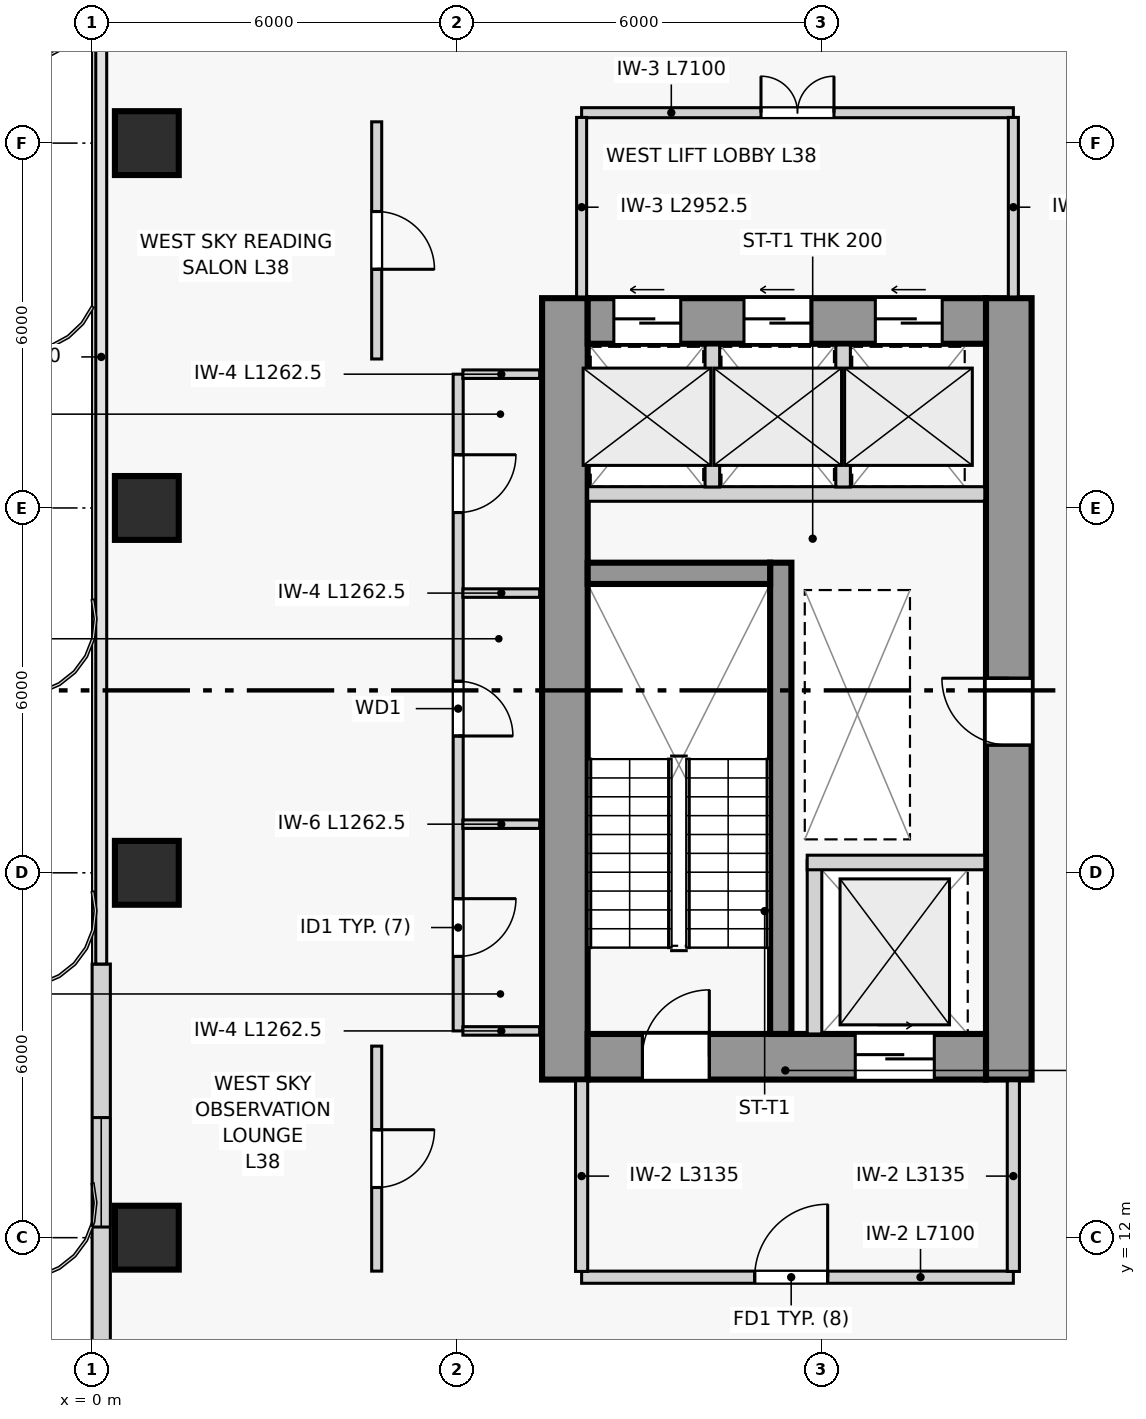
"""IFC4 building model, lengths in metres.
Left out: names, types, materials, properties, quantities, classifications, styles, units other than length and angle.
Written with IfcOpenShell. Run it as: python <this file> out.ifc"""

import sys

from ifc_helpers import new_model, si_unit, direction, frame, frame_2d, origin, origin_2d, place, context, subcontext, project, spatial, rectangle, extrude, source, transform, mapped, element, fill, save


model = new_model("IFC4")
c1 = context("Model", 3, precision=1e-05, world=origin(), true_north=direction((0.0, 1.0)))
c2 = subcontext(c1, "Body", "Model", "MODEL_VIEW")
j1 = project(units=[si_unit("LENGTHUNIT", "METRE"), si_unit("PLANEANGLEUNIT", "RADIAN")], contexts=[c1])
p1 = place(None, origin())
s1 = spatial("IfcSite", under=j1, at=p1, CompositionType="ELEMENT")
p2 = place(p1, origin())
s2 = spatial("IfcBuilding", under=s1, at=p2, CompositionType="ELEMENT")
p3 = place(p2, frame((0.0, 0.0, 144.9)))
s3 = spatial("IfcBuildingStorey", under=s2, at=p3, CompositionType="ELEMENT", Elevation=144.9)
p4 = place(p3, frame((7.775, 14.6, 0.0), z_axis=(0.0, 0.0, 1.0), x_axis=(0.0, 1.0, 0.0)))
e1 = element("IfcWall", 1, at=p4, inside=s3, PredefinedType="SHEAR", context=c2, shape_type="SweptSolid", body=[
    extrude(rectangle(XDim=12.85, YDim=0.75, at=frame_2d((6.425, 0.0))), origin(), (0.0, 0.0, 1.0), 3.6),
])
p5 = place(p3, frame((15.075, 14.6, 0.0), z_axis=(0.0, 0.0, 1.0), x_axis=(0.0, 1.0, 0.0)))
e2 = element("IfcWall", 2, at=p5, inside=s3, PredefinedType="SHEAR", context=c2, shape_type="SweptSolid", body=[
    extrude(rectangle(XDim=12.85, YDim=0.75, at=frame_2d((6.425, 0.0))), origin(), (0.0, 0.0, 1.0), 3.6),
])
p6 = place(p5, frame((5.5, 0.0, 0.0)))
e3 = element("IfcOpeningElement", 3, at=p6, cuts=e2, PredefinedType="OPENING", context=c2, shape_type="SweptSolid", body=[
    extrude(rectangle(XDim=1.1, YDim=2.2, at=frame_2d((0.55, 1.1))), frame((0.0, 0.385, 0.0), z_axis=(0.0, -1.0, 0.0), x_axis=(1.0, 0.0, 0.0)), (0.0, 0.0, 1.0), 0.77),
])
p7 = place(p3, frame((8.15, 14.975, 0.0), z_axis=(0.0, 0.0, 1.0), x_axis=(1.0, 0.0, 0.0)))
e4 = element("IfcWall", 4, at=p7, inside=s3, PredefinedType="SHEAR", context=c2, shape_type="SweptSolid", body=[
    extrude(rectangle(XDim=6.55, YDim=0.75, at=frame_2d((3.275, 0.0))), origin(), (0.0, 0.0, 1.0), 3.6),
])
p8 = place(p7, frame((0.9, 0.0, 0.0)))
e5 = element("IfcOpeningElement", 5, at=p8, cuts=e4, PredefinedType="OPENING", context=c2, shape_type="SweptSolid", body=[
    extrude(rectangle(XDim=1.1, YDim=2.2, at=frame_2d((0.55, 1.1))), frame((0.0, 0.385, 0.0), z_axis=(0.0, -1.0, 0.0), x_axis=(1.0, 0.0, 0.0)), (0.0, 0.0, 1.0), 0.77),
])
p9 = place(p7, frame((4.4, 0.0, 0.0)))
e6 = element("IfcOpeningElement", 6, at=p9, cuts=e4, PredefinedType="OPENING", context=c2, shape_type="SweptSolid", body=[
    extrude(rectangle(XDim=1.3, YDim=2.2, at=frame_2d((0.65, 1.1))), frame((0.0, 0.385, 0.0), z_axis=(0.0, -1.0, 0.0), x_axis=(1.0, 0.0, 0.0)), (0.0, 0.0, 1.0), 0.77),
])
p10 = place(p3, frame((8.15, 27.075, 0.0), z_axis=(0.0, 0.0, 1.0), x_axis=(1.0, 0.0, 0.0)))
e7 = element("IfcWall", 7, at=p10, inside=s3, PredefinedType="SHEAR", context=c2, shape_type="SweptSolid", body=[
    extrude(rectangle(XDim=6.55, YDim=0.75, at=frame_2d((3.275, 0.0))), origin(), (0.0, 0.0, 1.0), 3.6),
])
p11 = place(p10, frame((0.43, 0.0, 0.0)))
e8 = element("IfcOpeningElement", 8, at=p11, cuts=e7, PredefinedType="OPENING", context=c2, shape_type="SweptSolid", body=[
    extrude(rectangle(XDim=1.1, YDim=2.2, at=frame_2d((0.55, 1.1))), frame((0.0, 0.385, 0.0), z_axis=(0.0, -1.0, 0.0), x_axis=(1.0, 0.0, 0.0)), (0.0, 0.0, 1.0), 0.77),
])
p12 = place(p10, frame((2.57, 0.0, 0.0)))
e9 = element("IfcOpeningElement", 9, at=p12, cuts=e7, PredefinedType="OPENING", context=c2, shape_type="SweptSolid", body=[
    extrude(rectangle(XDim=1.1, YDim=2.2, at=frame_2d((0.55, 1.1))), frame((0.0, 0.385, 0.0), z_axis=(0.0, -1.0, 0.0), x_axis=(1.0, 0.0, 0.0)), (0.0, 0.0, 1.0), 0.77),
])
p13 = place(p10, frame((4.73, 0.0, 0.0)))
e10 = element("IfcOpeningElement", 10, at=p13, cuts=e7, PredefinedType="OPENING", context=c2, shape_type="SweptSolid", body=[
    extrude(rectangle(XDim=1.1, YDim=2.2, at=frame_2d((0.55, 1.1))), frame((0.0, 0.385, 0.0), z_axis=(0.0, -1.0, 0.0), x_axis=(1.0, 0.0, 0.0)), (0.0, 0.0, 1.0), 0.77),
])
p14 = place(p3, frame((11.325, 15.35, 0.0), z_axis=(0.0, 0.0, 1.0), x_axis=(0.0, 1.0, 0.0)))
e11 = element("IfcWall", 11, at=p14, inside=s3, PredefinedType="SHEAR", context=c2, shape_type="SweptSolid", body=[
    extrude(rectangle(XDim=7.75, YDim=0.35, at=frame_2d((3.875, 0.0))), origin(), (0.0, 0.0, 1.0), 3.6),
])
p15 = place(p3, frame((8.15, 22.925, 0.0), z_axis=(0.0, 0.0, 1.0), x_axis=(1.0, 0.0, 0.0)))
e12 = element("IfcWall", 12, at=p15, inside=s3, PredefinedType="SHEAR", context=c2, shape_type="SweptSolid", body=[
    extrude(rectangle(XDim=3.0, YDim=0.35, at=frame_2d((1.5, 0.0))), origin(), (0.0, 0.0, 1.0), 3.6),
])
m1 = source(origin(), c2, "Body", "SweptSolid", [
    extrude(rectangle(XDim=1.05, YDim=1.05, at=origin_2d()), origin(), (0.0, 0.0, 1.0), 3.6),
])
for number, where, z_axis, x_axis in (
    (13, (0.9, 12.0, 0.0), (0.0, 0.0, 1.0), (1.0, 0.0, 0.0)),
    (14, (0.9, 18.0, 0.0), (0.0, 0.0, 1.0), (1.0, 0.0, 0.0)),
    (15, (0.9, 24.0, 0.0), (0.0, 0.0, 1.0), (1.0, 0.0, 0.0)),
    (16, (0.9, 30.0, 0.0), (0.0, 0.0, 1.0), (1.0, 0.0, 0.0)),
):
    element("IfcColumn", number, at=place(p3, frame(where, z_axis=z_axis, x_axis=x_axis)), inside=s3, PredefinedType="COLUMN", context=c2, shape_type="MappedRepresentation", body=[
        mapped(m1, transform((0.0, 0.0, 0.0), scale=1.0)),
    ])
p16 = place(p3, frame((0.15, 16.5, 0.0), z_axis=(0.0, 0.0, 1.0), x_axis=(0.0, -1.0, 0.0)))
e17 = element("IfcWall", 17, at=p16, inside=s3, PredefinedType="SOLIDWALL", context=c2, shape_type="SweptSolid", body=[
    extrude(rectangle(XDim=12.75, YDim=0.3, at=frame_2d((6.375, 0.0))), origin(), (0.0, 0.0, 1.0), 3.28),
])
p17 = place(p16, frame((2.525, 0.0, 0.8)))
e18 = element("IfcOpeningElement", 18, at=p17, cuts=e17, PredefinedType="OPENING", context=c2, shape_type="SweptSolid", body=[
    extrude(rectangle(XDim=1.8, YDim=2.1, at=frame_2d((0.9, 1.05))), frame((0.0, 0.16, 0.0), z_axis=(0.0, -1.0, 0.0), x_axis=(1.0, 0.0, 0.0)), (0.0, 0.0, 1.0), 0.32),
])
p18 = place(p16, frame((8.8, 0.0, 0.8)))
e19 = element("IfcOpeningElement", 19, at=p18, cuts=e17, PredefinedType="OPENING", context=c2, shape_type="SweptSolid", body=[
    extrude(rectangle(XDim=1.8, YDim=2.1, at=frame_2d((0.9, 1.05))), frame((0.0, 0.16, 0.0), z_axis=(0.0, -1.0, 0.0), x_axis=(1.0, 0.0, 0.0)), (0.0, 0.0, 1.0), 0.32),
])
p19 = place(p3, frame((11.88, 15.35, 0.0), z_axis=(0.0, 0.0, 1.0), x_axis=(0.0, 1.0, 0.0)))
e20 = element("IfcWall", 20, at=p19, inside=s3, PredefinedType="PARTITIONING", context=c2, shape_type="SweptSolid", body=[
    extrude(rectangle(XDim=2.85, YDim=0.24, at=frame_2d((1.425, 0.0))), origin(), (0.0, 0.0, 1.0), 3.28),
])
p20 = place(p3, frame((11.76, 18.17, 0.0), z_axis=(0.0, 0.0, 1.0), x_axis=(1.0, 0.0, 0.0)))
e21 = element("IfcWall", 21, at=p20, inside=s3, PredefinedType="PARTITIONING", context=c2, shape_type="SweptSolid", body=[
    extrude(rectangle(XDim=2.92, YDim=0.24, at=frame_2d((1.46, 0.0))), origin(), (0.0, 0.0, 1.0), 3.28),
])
p21 = place(p3, frame((8.05, 11.35, 0.0), z_axis=(0.0, 0.0, 1.0), x_axis=(1.0, 0.0, 0.0)))
e22 = element("IfcWall", 22, at=p21, inside=s3, PredefinedType="PARTITIONING", context=c2, shape_type="SweptSolid", body=[
    extrude(rectangle(XDim=7.1, YDim=0.2, at=frame_2d((3.55, 0.0))), origin(), (0.0, 0.0, 1.0), 3.28),
])
p22 = place(p21, frame((2.846, 0.0, 0.0)))
e23 = element("IfcOpeningElement", 23, at=p22, cuts=e22, PredefinedType="OPENING", context=c2, shape_type="SweptSolid", body=[
    extrude(rectangle(XDim=1.2, YDim=2.2, at=frame_2d((0.6, 1.1))), frame((0.0, 0.11, 0.0), z_axis=(0.0, -1.0, 0.0), x_axis=(1.0, 0.0, 0.0)), (0.0, 0.0, 1.0), 0.22),
])
for number, where, z_axis, x_axis in (
    (24, (8.05, 11.445, 0.0), (0.0, 0.0, 1.0), (0.0, 1.0, 0.0)),
    (25, (15.15, 11.445, 0.0), (0.0, 0.0, 1.0), (0.0, 1.0, 0.0)),
):
    element("IfcWall", number, at=place(p3, frame(where, z_axis=z_axis, x_axis=x_axis)), inside=s3, PredefinedType="PARTITIONING", context=c2, shape_type="SweptSolid", body=[
        extrude(rectangle(XDim=3.135, YDim=0.2, at=frame_2d((1.567, 0.0))), origin(), (0.0, 0.0, 1.0), 3.28),
    ])
p23 = place(p3, frame((8.15, 24.23, 0.0), z_axis=(0.0, 0.0, 1.0), x_axis=(1.0, 0.0, 0.0)))
e26 = element("IfcWall", 26, at=p23, inside=s3, PredefinedType="PARTITIONING", context=c2, shape_type="SweptSolid", body=[
    extrude(rectangle(XDim=6.53, YDim=0.24, at=frame_2d((3.265, 0.0))), origin(), (0.0, 0.0, 1.0), 3.28),
])
for number, where, z_axis, x_axis in (
    (27, (10.2, 24.345, 0.0), (0.0, 0.0, 1.0), (0.0, 1.0, 0.0)),
    (28, (12.35, 24.345, 0.0), (0.0, 0.0, 1.0), (0.0, 1.0, 0.0)),
):
    element("IfcWall", number, at=place(p3, frame(where, z_axis=z_axis, x_axis=x_axis)), inside=s3, PredefinedType="PARTITIONING", context=c2, shape_type="SweptSolid", body=[
        extrude(rectangle(XDim=2.335, YDim=0.24, at=frame_2d((1.167, 0.0))), origin(), (0.0, 0.0, 1.0), 3.28),
    ])
p24 = place(p3, frame((8.05, 30.5, 0.0), z_axis=(0.0, 0.0, 1.0), x_axis=(1.0, 0.0, 0.0)))
e29 = element("IfcWall", 29, at=p24, inside=s3, PredefinedType="PARTITIONING", context=c2, shape_type="SweptSolid", body=[
    extrude(rectangle(XDim=7.1, YDim=0.165, at=frame_2d((3.55, 0.0))), origin(), (0.0, 0.0, 1.0), 3.28),
])
p25 = place(p24, frame((2.95, 0.0, 0.0)))
e30 = element("IfcOpeningElement", 30, at=p25, cuts=e29, PredefinedType="OPENING", context=c2, shape_type="SweptSolid", body=[
    extrude(rectangle(XDim=1.2, YDim=2.2, at=frame_2d((0.6, 1.1))), frame((0.0, 0.093, 0.0), z_axis=(0.0, -1.0, 0.0), x_axis=(1.0, 0.0, 0.0)), (0.0, 0.0, 1.0), 0.185),
])
for number, where, z_axis, x_axis in (
    (31, (8.05, 27.47, 0.0), (0.0, 0.0, 1.0), (0.0, 1.0, 0.0)),
    (32, (15.15, 27.47, 0.0), (0.0, 0.0, 1.0), (0.0, 1.0, 0.0)),
):
    element("IfcWall", number, at=place(p3, frame(where, z_axis=z_axis, x_axis=x_axis)), inside=s3, PredefinedType="PARTITIONING", context=c2, shape_type="SweptSolid", body=[
        extrude(rectangle(XDim=2.953, YDim=0.165, at=frame_2d((1.476, 0.0))), origin(), (0.0, 0.0, 1.0), 3.28),
    ])
p26 = place(p3, frame((6.02, 15.4, 0.0), z_axis=(0.0, 0.0, 1.0), x_axis=(0.0, 1.0, 0.0)))
e33 = element("IfcWall", 33, at=p26, inside=s3, PredefinedType="PARTITIONING", context=c2, shape_type="SweptSolid", body=[
    extrude(rectangle(XDim=10.8, YDim=0.165, at=frame_2d((5.4, 0.0))), origin(), (0.0, 0.0, 1.0), 3.28),
])
p27 = place(p26, frame((1.225, 0.0, 0.0)))
e34 = element("IfcOpeningElement", 34, at=p27, cuts=e33, PredefinedType="OPENING", context=c2, shape_type="SweptSolid", body=[
    extrude(rectangle(XDim=0.95, YDim=2.1, at=frame_2d((0.475, 1.05))), frame((0.0, 0.093, 0.0), z_axis=(0.0, -1.0, 0.0), x_axis=(1.0, 0.0, 0.0)), (0.0, 0.0, 1.0), 0.185),
])
p28 = place(p26, frame((4.85, 0.0, 0.0)))
e35 = element("IfcOpeningElement", 35, at=p28, cuts=e33, PredefinedType="OPENING", context=c2, shape_type="SweptSolid", body=[
    extrude(rectangle(XDim=0.9, YDim=2.1, at=frame_2d((0.45, 1.05))), frame((0.0, 0.093, 0.0), z_axis=(0.0, -1.0, 0.0), x_axis=(1.0, 0.0, 0.0)), (0.0, 0.0, 1.0), 0.185),
])
p29 = place(p26, frame((8.525, 0.0, 0.0)))
e36 = element("IfcOpeningElement", 36, at=p29, cuts=e33, PredefinedType="OPENING", context=c2, shape_type="SweptSolid", body=[
    extrude(rectangle(XDim=0.95, YDim=2.1, at=frame_2d((0.475, 1.05))), frame((0.0, 0.093, 0.0), z_axis=(0.0, -1.0, 0.0), x_axis=(1.0, 0.0, 0.0)), (0.0, 0.0, 1.0), 0.185),
])
for number, where, z_axis, x_axis in (
    (37, (6.097, 15.4, 0.0), (0.0, 0.0, 1.0), (1.0, 0.0, 0.0)),
    (38, (6.097, 26.2, 0.0), (0.0, 0.0, 1.0), (1.0, 0.0, 0.0)),
):
    element("IfcWall", number, at=place(p3, frame(where, z_axis=z_axis, x_axis=x_axis)), inside=s3, PredefinedType="PARTITIONING", context=c2, shape_type="SweptSolid", body=[
        extrude(rectangle(XDim=1.263, YDim=0.14, at=frame_2d((0.631, 0.0))), origin(), (0.0, 0.0, 1.0), 3.28),
    ])
p30 = place(p3, frame((6.097, 18.8, 0.0), z_axis=(0.0, 0.0, 1.0), x_axis=(1.0, 0.0, 0.0)))
e39 = element("IfcWall", 39, at=p30, inside=s3, PredefinedType="PLUMBINGWALL", context=c2, shape_type="SweptSolid", body=[
    extrude(rectangle(XDim=1.263, YDim=0.14, at=frame_2d((0.631, 0.0))), origin(), (0.0, 0.0, 1.0), 3.28),
])
p31 = place(p3, frame((6.097, 22.6, 0.0), z_axis=(0.0, 0.0, 1.0), x_axis=(1.0, 0.0, 0.0)))
e40 = element("IfcWall", 40, at=p31, inside=s3, PredefinedType="PARTITIONING", context=c2, shape_type="SweptSolid", body=[
    extrude(rectangle(XDim=1.263, YDim=0.14, at=frame_2d((0.631, 0.0))), origin(), (0.0, 0.0, 1.0), 3.28),
])
p32 = place(p3, frame((4.68, 11.45, 0.0), z_axis=(0.0, 0.0, 1.0), x_axis=(0.0, 1.0, 0.0)))
e41 = element("IfcWall", 41, at=p32, inside=s3, PredefinedType="PARTITIONING", context=c2, shape_type="SweptSolid", body=[
    extrude(rectangle(XDim=3.7, YDim=0.165, at=frame_2d((1.85, 0.0))), origin(), (0.0, 0.0, 1.0), 3.28),
])
p33 = place(p32, frame((1.375, 0.0, 0.0)))
e42 = element("IfcOpeningElement", 42, at=p33, cuts=e41, PredefinedType="OPENING", context=c2, shape_type="SweptSolid", body=[
    extrude(rectangle(XDim=0.95, YDim=2.1, at=frame_2d((0.475, 1.05))), frame((0.0, 0.093, 0.0), z_axis=(0.0, -1.0, 0.0), x_axis=(1.0, 0.0, 0.0)), (0.0, 0.0, 1.0), 0.185),
])
p34 = place(p3, frame((4.68, 26.45, 0.0), z_axis=(0.0, 0.0, 1.0), x_axis=(0.0, 1.0, 0.0)))
e43 = element("IfcWall", 43, at=p34, inside=s3, PredefinedType="PARTITIONING", context=c2, shape_type="SweptSolid", body=[
    extrude(rectangle(XDim=3.9, YDim=0.165, at=frame_2d((1.95, 0.0))), origin(), (0.0, 0.0, 1.0), 3.28),
])
p35 = place(p34, frame((1.475, 0.0, 0.0)))
e44 = element("IfcOpeningElement", 44, at=p35, cuts=e43, PredefinedType="OPENING", context=c2, shape_type="SweptSolid", body=[
    extrude(rectangle(XDim=0.95, YDim=2.1, at=frame_2d((0.475, 1.05))), frame((0.0, 0.093, 0.0), z_axis=(0.0, -1.0, 0.0), x_axis=(1.0, 0.0, 0.0)), (0.0, 0.0, 1.0), 0.185),
])
m2 = source(origin(), c2, "Body", "SweptSolid", [
    extrude(rectangle(XDim=1.8, YDim=2.1, at=frame_2d((0.9, 1.05))), frame((0.0, 0.03, 0.0), z_axis=(0.0, -1.0, 0.0), x_axis=(1.0, 0.0, 0.0)), (0.0, 0.0, 1.0), 0.06),
])
p36 = place(p17, origin())
e45 = element("IfcWindow", 45, at=p36, inside=s3, PartitioningType="SINGLE_PANEL", PredefinedType="WINDOW", context=c2, shape_type="MappedRepresentation", body=[
    mapped(m2, transform((0.0, 0.0, 0.0), scale=1.0)),
])
fill(e18, e45)
m3 = source(origin(), c2, "Body", "SweptSolid", [
    extrude(rectangle(XDim=1.1, YDim=2.2, at=frame_2d((0.55, 1.1))), frame((0.0, 0.025, 0.0), z_axis=(0.0, -1.0, 0.0), x_axis=(1.0, 0.0, 0.0)), (0.0, 0.0, 1.0), 0.05),
])
p37 = place(p8, origin())
e46 = element("IfcDoor", 46, at=p37, inside=s3, OperationType="SINGLE_SWING_RIGHT", PredefinedType="DOOR", context=c2, shape_type="MappedRepresentation", body=[
    mapped(m3, transform((0.0, 0.0, 0.0), scale=1.0)),
])
fill(e5, e46)
m4 = source(origin(), c2, "Body", "SweptSolid", [
    extrude(rectangle(XDim=1.3, YDim=2.2, at=frame_2d((0.65, 1.1))), frame((0.0, 0.025, 0.0), z_axis=(0.0, -1.0, 0.0), x_axis=(1.0, 0.0, 0.0)), (0.0, 0.0, 1.0), 0.05),
])
p38 = place(p9, origin())
e47 = element("IfcDoor", 47, at=p38, inside=s3, OperationType="SLIDING_TO_RIGHT", PredefinedType="DOOR", context=c2, shape_type="MappedRepresentation", body=[
    mapped(m4, transform((0.0, 0.0, 0.0), scale=1.0)),
])
fill(e6, e47)
m5 = source(origin(), c2, "Body", "SweptSolid", [
    extrude(rectangle(XDim=1.2, YDim=2.2, at=frame_2d((0.6, 1.1))), frame((0.0, 0.025, 0.0), z_axis=(0.0, -1.0, 0.0), x_axis=(1.0, 0.0, 0.0)), (0.0, 0.0, 1.0), 0.05),
])
p39 = place(p22, origin())
e48 = element("IfcDoor", 48, at=p39, inside=s3, OperationType="SINGLE_SWING_RIGHT", PredefinedType="DOOR", context=c2, shape_type="MappedRepresentation", body=[
    mapped(m5, transform((0.0, 0.0, 0.0), scale=1.0)),
])
fill(e23, e48)
m6 = source(origin(), c2, "Body", "SweptSolid", [
    extrude(rectangle(XDim=1.1, YDim=2.2, at=frame_2d((0.55, 1.1))), frame((0.0, 0.025, 0.0), z_axis=(0.0, -1.0, 0.0), x_axis=(1.0, 0.0, 0.0)), (0.0, 0.0, 1.0), 0.05),
])
p40 = place(p11, origin())
e49 = element("IfcDoor", 49, at=p40, inside=s3, OperationType="SLIDING_TO_LEFT", PredefinedType="DOOR", context=c2, shape_type="MappedRepresentation", body=[
    mapped(m6, transform((0.0, 0.0, 0.0), scale=1.0)),
])
fill(e8, e49)
p41 = place(p12, origin())
e50 = element("IfcDoor", 50, at=p41, inside=s3, OperationType="SLIDING_TO_LEFT", PredefinedType="DOOR", context=c2, shape_type="MappedRepresentation", body=[
    mapped(m6, transform((0.0, 0.0, 0.0), scale=1.0)),
])
fill(e9, e50)
p42 = place(p13, origin())
e51 = element("IfcDoor", 51, at=p42, inside=s3, OperationType="SLIDING_TO_LEFT", PredefinedType="DOOR", context=c2, shape_type="MappedRepresentation", body=[
    mapped(m6, transform((0.0, 0.0, 0.0), scale=1.0)),
])
fill(e10, e51)
p43 = place(p25, origin())
e52 = element("IfcDoor", 52, at=p43, inside=s3, OperationType="DOUBLE_DOOR_SINGLE_SWING", PredefinedType="DOOR", context=c2, shape_type="MappedRepresentation", body=[
    mapped(m5, transform((0.0, 0.0, 0.0), scale=1.0)),
])
fill(e30, e52)
p44 = place(p6, origin())
e53 = element("IfcDoor", 53, at=p44, inside=s3, OperationType="SINGLE_SWING_RIGHT", PredefinedType="DOOR", context=c2, shape_type="MappedRepresentation", body=[
    mapped(m3, transform((0.0, 0.0, 0.0), scale=1.0)),
])
fill(e3, e53)
m7 = source(origin(), c2, "Body", "SweptSolid", [
    extrude(rectangle(XDim=0.95, YDim=2.1, at=frame_2d((0.475, 1.05))), frame((0.0, 0.025, 0.0), z_axis=(0.0, -1.0, 0.0), x_axis=(1.0, 0.0, 0.0)), (0.0, 0.0, 1.0), 0.05),
])
p45 = place(p27, frame((0.95, 0.0, 0.0), z_axis=(0.0, 0.0, 1.0), x_axis=(-1.0, 0.0, 0.0)))
e54 = element("IfcDoor", 54, at=p45, inside=s3, OperationType="SINGLE_SWING_LEFT", PredefinedType="DOOR", context=c2, shape_type="MappedRepresentation", body=[
    mapped(m7, transform((0.0, 0.0, 0.0), scale=1.0)),
])
fill(e34, e54)
m8 = source(origin(), c2, "Body", "SweptSolid", [
    extrude(rectangle(XDim=0.9, YDim=2.1, at=frame_2d((0.45, 1.05))), frame((0.0, 0.025, 0.0), z_axis=(0.0, -1.0, 0.0), x_axis=(1.0, 0.0, 0.0)), (0.0, 0.0, 1.0), 0.05),
])
p46 = place(p28, frame((0.9, 0.0, 0.0), z_axis=(0.0, 0.0, 1.0), x_axis=(-1.0, 0.0, 0.0)))
e55 = element("IfcDoor", 55, at=p46, inside=s3, OperationType="SINGLE_SWING_RIGHT", PredefinedType="DOOR", context=c2, shape_type="MappedRepresentation", body=[
    mapped(m8, transform((0.0, 0.0, 0.0), scale=1.0)),
])
fill(e35, e55)
p47 = place(p29, frame((0.95, 0.0, 0.0), z_axis=(0.0, 0.0, 1.0), x_axis=(-1.0, 0.0, 0.0)))
e56 = element("IfcDoor", 56, at=p47, inside=s3, OperationType="SINGLE_SWING_LEFT", PredefinedType="DOOR", context=c2, shape_type="MappedRepresentation", body=[
    mapped(m7, transform((0.0, 0.0, 0.0), scale=1.0)),
])
fill(e36, e56)
p48 = place(p33, frame((0.95, 0.0, 0.0), z_axis=(0.0, 0.0, 1.0), x_axis=(-1.0, 0.0, 0.0)))
e57 = element("IfcDoor", 57, at=p48, inside=s3, OperationType="SINGLE_SWING_LEFT", PredefinedType="DOOR", context=c2, shape_type="MappedRepresentation", body=[
    mapped(m7, transform((0.0, 0.0, 0.0), scale=1.0)),
])
fill(e42, e57)
p49 = place(p35, frame((0.95, 0.0, 0.0), z_axis=(0.0, 0.0, 1.0), x_axis=(-1.0, 0.0, 0.0)))
e58 = element("IfcDoor", 58, at=p49, inside=s3, OperationType="SINGLE_SWING_RIGHT", PredefinedType="DOOR", context=c2, shape_type="MappedRepresentation", body=[
    mapped(m7, transform((0.0, 0.0, 0.0), scale=1.0)),
])
fill(e44, e58)
save(model, sys.argv[1])
